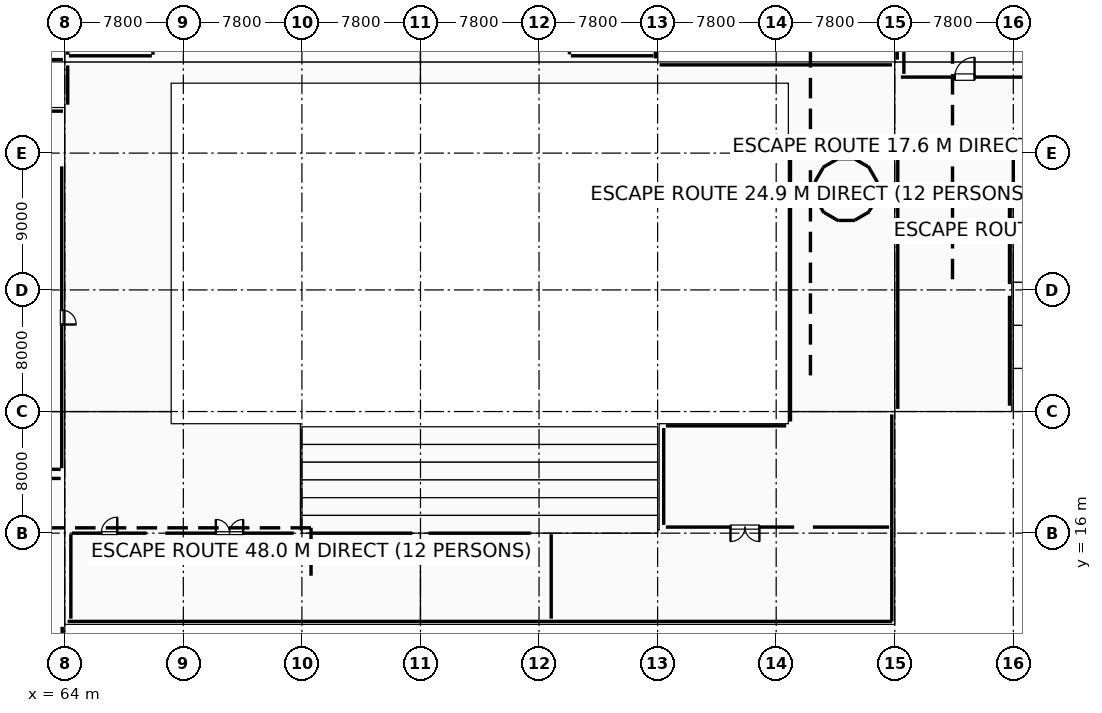
"""IFC4 building model, lengths in metres.
Left out: names, types, materials, properties, quantities, classifications, styles, units other than length and angle.
Written with IfcOpenShell. Run it as: python <this file> out.ifc"""

import sys

from ifc_helpers import new_model, si_unit, direction, frame, frame_2d, origin, origin_2d, place, context, subcontext, project, spatial, rectangle, i_section, extrude, element, fill, save


model = new_model("IFC4")
c1 = context("Model", 3, precision=1e-05, world=origin(), true_north=direction((0.0, 1.0)))
c2 = subcontext(c1, "Body", "Model", "MODEL_VIEW")
j1 = project(units=[si_unit("LENGTHUNIT", "METRE"), si_unit("PLANEANGLEUNIT", "RADIAN")], contexts=[c1])
p1 = place(None, origin())
s1 = spatial("IfcSite", under=j1, at=p1, CompositionType="ELEMENT")
p2 = place(p1, origin())
s2 = spatial("IfcBuilding", under=s1, at=p2, CompositionType="ELEMENT")
p3 = place(p2, frame((0.0, 0.0, 10.2)))
s3 = spatial("IfcBuildingStorey", under=s2, at=p3, CompositionType="ELEMENT", Elevation=10.2)
for number, where, z_axis, x_axis in (
    (1, (126.4, 24.0, 0.0), (0.0, 0.0, 1.0), (1.0, 0.0, 0.0)),
    (2, (126.4, 32.0, 0.0), (0.0, 0.0, 1.0), (1.0, 0.0, 0.0)),
    (3, (126.4, 41.0, 0.0), (0.0, 0.0, 1.0), (1.0, 0.0, 0.0)),
):
    element("IfcColumn", number, at=place(p3, frame(where, z_axis=z_axis, x_axis=x_axis)), inside=s3, PredefinedType="COLUMN", context=c2, shape_type="SweptSolid", body=[
        extrude(rectangle(XDim=0.75, YDim=0.75, at=origin_2d()), origin(), (0.0, 0.0, 1.0), 4.8),
    ])
for number, where, z_axis, x_axis in (
    (4, (64.0, 47.0, 0.0), (0.0, 0.0, 1.0), (1.0, 0.0, 0.0)),
    (5, (71.8, 47.0, 0.0), (0.0, 0.0, 1.0), (1.0, 0.0, 0.0)),
    (6, (79.6, 47.0, 0.0), (0.0, 0.0, 1.0), (1.0, 0.0, 0.0)),
    (7, (87.4, 47.0, 0.0), (0.0, 0.0, 1.0), (1.0, 0.0, 0.0)),
    (8, (95.2, 47.0, 0.0), (0.0, 0.0, 1.0), (1.0, 0.0, 0.0)),
    (9, (103.0, 47.0, 0.0), (0.0, 0.0, 1.0), (1.0, 0.0, 0.0)),
):
    element("IfcColumn", number, at=place(p3, frame(where, z_axis=z_axis, x_axis=x_axis)), inside=s3, PredefinedType="COLUMN", context=c2, shape_type="SweptSolid", body=[
        extrude(i_section(OverallWidth=0.25, OverallDepth=0.45, WebThickness=0.011, FlangeThickness=0.014, FilletRadius=0.015, at=origin_2d()), origin(), (0.0, 0.0, 1.0), 4.8),
    ])
for number, where, z_axis, x_axis in (
    (10, (70.0, 16.0, 0.0), (0.0, 0.0, 1.0), (1.0, 0.0, 0.0)),
    (11, (70.0, 41.0, 0.0), (0.0, 0.0, 1.0), (1.0, 0.0, 0.0)),
):
    element("IfcColumn", number, at=place(p3, frame(where, z_axis=z_axis, x_axis=x_axis)), inside=s3, PredefinedType="COLUMN", context=c2, shape_type="SweptSolid", body=[
        extrude(rectangle(XDim=1.2, YDim=1.2, at=origin_2d()), origin(), (0.0, 0.0, 1.0), 4.8),
    ])
for number, where, z_axis, x_axis in (
    (12, (79.6, 16.0, 0.0), (0.0, 0.0, 1.0), (1.0, 0.0, 0.0)),
    (13, (79.6, 41.0, 0.0), (0.0, 0.0, 1.0), (1.0, 0.0, 0.0)),
    (14, (87.4, 16.0, 0.0), (0.0, 0.0, 1.0), (1.0, 0.0, 0.0)),
    (15, (87.4, 41.0, 0.0), (0.0, 0.0, 1.0), (1.0, 0.0, 0.0)),
    (16, (95.2, 16.0, 0.0), (0.0, 0.0, 1.0), (1.0, 0.0, 0.0)),
    (17, (95.2, 41.0, 0.0), (0.0, 0.0, 1.0), (1.0, 0.0, 0.0)),
    (18, (103.0, 16.0, 0.0), (0.0, 0.0, 1.0), (1.0, 0.0, 0.0)),
    (19, (103.0, 41.0, 0.0), (0.0, 0.0, 1.0), (1.0, 0.0, 0.0)),
):
    element("IfcColumn", number, at=place(p3, frame(where, z_axis=z_axis, x_axis=x_axis)), inside=s3, PredefinedType="COLUMN", context=c2, shape_type="SweptSolid", body=[
        extrude(rectangle(XDim=1.05, YDim=1.05, at=origin_2d()), origin(), (0.0, 0.0, 1.0), 4.8),
    ])
for number, where, z_axis, x_axis in (
    (20, (112.6, 16.0, 0.0), (0.0, 0.0, 1.0), (1.0, 0.0, 0.0)),
    (21, (112.6, 41.0, 0.0), (0.0, 0.0, 1.0), (1.0, 0.0, 0.0)),
):
    element("IfcColumn", number, at=place(p3, frame(where, z_axis=z_axis, x_axis=x_axis)), inside=s3, PredefinedType="COLUMN", context=c2, shape_type="SweptSolid", body=[
        extrude(rectangle(XDim=1.2, YDim=1.2, at=origin_2d()), origin(), (0.0, 0.0, 1.0), 4.8),
    ])
p4 = place(p3, frame((40.12, 43.76, 0.0), z_axis=(0.0, 0.0, 1.0), x_axis=(1.0, 0.0, 0.0)))
e22 = element("IfcWall", 22, at=p4, inside=s3, PredefinedType="PARAPET", context=c2, shape_type="SweptSolid", body=[
    extrude(rectangle(XDim=23.76, YDim=0.18, at=frame_2d((11.88, 0.0))), origin(), (0.0, 0.0, 1.0), 0.88),
])
p5 = place(p3, frame((64.195, 44.185, 0.0), z_axis=(0.0, 0.0, 1.0), x_axis=(0.0, 1.0, 0.0)))
e23 = element("IfcWall", 23, at=p5, inside=s3, PredefinedType="STANDARD", context=c2, shape_type="SweptSolid", body=[
    extrude(rectangle(XDim=2.582, YDim=0.35, at=frame_2d((1.291, 0.0))), origin(), (0.0, 0.0, 1.0), 3.725),
])
p6 = place(p3, frame((63.876, 47.15, 0.0), z_axis=(0.0, 0.0, 1.0), x_axis=(-1.0, 0.0, 0.0)))
e24 = element("IfcWall", 24, at=p6, inside=s3, PredefinedType="ELEMENTEDWALL", context=c2, shape_type="SweptSolid", body=[
    extrude(rectangle(XDim=9.736, YDim=0.26, at=frame_2d((4.868, 0.0))), origin(), (0.0, 0.0, 1.0), 4.54),
])
p7 = place(p6, frame((4.076, 0.0, 0.95)))
e25 = element("IfcOpeningElement", 25, at=p7, cuts=e24, PredefinedType="OPENING", context=c2, shape_type="SweptSolid", body=[
    extrude(rectangle(XDim=1.6, YDim=2.1, at=frame_2d((0.8, 1.05))), frame((0.0, 0.14, 0.0), z_axis=(0.0, -1.0, 0.0), x_axis=(1.0, 0.0, 0.0)), (0.0, 0.0, 1.0), 0.28),
])
p8 = place(p3, frame((102.85, 49.767, 0.0), z_axis=(0.0, 0.0, 1.0), x_axis=(0.0, -1.0, 0.0)))
e26 = element("IfcWall", 26, at=p8, inside=s3, PredefinedType="ELEMENTEDWALL", context=c2, shape_type="SweptSolid", body=[
    extrude(rectangle(XDim=2.534, YDim=0.26, at=frame_2d((1.267, 0.0))), origin(), (0.0, 0.0, 1.0), 4.175),
])
p9 = place(p3, frame((103.129, 46.805, 0.0), z_axis=(0.0, 0.0, 1.0), x_axis=(1.0, 0.0, 0.0)))
e27 = element("IfcWall", 27, at=p9, inside=s3, PredefinedType="STANDARD", context=c2, shape_type="SweptSolid", body=[
    extrude(rectangle(XDim=15.286, YDim=0.35, at=frame_2d((7.643, 0.0))), origin(), (0.0, 0.0, 1.0), 3.725),
])
p10 = place(p3, frame((118.76, 47.15, 0.0), z_axis=(0.0, 0.0, 1.0), x_axis=(0.0, 1.0, 0.0)))
e28 = element("IfcWall", 28, at=p10, inside=s3, PredefinedType="STANDARD", context=c2, shape_type="SweptSolid", body=[
    extrude(rectangle(XDim=2.467, YDim=0.28, at=frame_2d((1.233, 0.0))), origin(), (0.0, 0.0, 1.0), 4.54),
])
p11 = place(p3, frame((147.55, 38.56, 0.0), z_axis=(0.0, 0.0, 1.0), x_axis=(-1.0, 0.0, 0.0)))
e29 = element("IfcWall", 29, at=p11, inside=s3, PredefinedType="STANDARD", context=c2, shape_type="SweptSolid", body=[
    extrude(rectangle(XDim=21.1, YDim=0.28, at=frame_2d((10.55, 0.0))), origin(), (0.0, 0.0, 1.0), 4.54),
])
p12 = place(p3, frame((126.15, 38.26, 0.0), z_axis=(0.0, 0.0, 1.0), x_axis=(0.0, -1.0, 0.0)))
e30 = element("IfcWall", 30, at=p12, inside=s3, PredefinedType="ELEMENTEDWALL", context=c2, shape_type="SweptSolid", body=[
    extrude(rectangle(XDim=5.877, YDim=0.26, at=frame_2d((2.938, 0.0))), origin(), (0.0, 0.0, 1.0), 3.775),
])
p13 = place(p3, frame((126.15, 31.617, 0.0), z_axis=(0.0, 0.0, 1.0), x_axis=(0.0, -1.0, 0.0)))
e31 = element("IfcWall", 31, at=p13, inside=s3, PredefinedType="ELEMENTEDWALL", context=c2, shape_type="SweptSolid", body=[
    extrude(rectangle(XDim=7.234, YDim=0.26, at=frame_2d((3.617, 0.0))), origin(), (0.0, 0.0, 1.0), 3.675),
])
p14 = place(p3, frame((118.405, 23.815, 0.0), z_axis=(0.0, 0.0, 1.0), x_axis=(0.0, -1.0, 0.0)))
e32 = element("IfcWall", 32, at=p14, inside=s3, PredefinedType="STANDARD", context=c2, shape_type="SweptSolid", body=[
    extrude(rectangle(XDim=13.63, YDim=0.35, at=frame_2d((6.815, 0.0))), origin(), (0.0, 0.0, 1.0), 3.725),
])
p15 = place(p3, frame((118.415, 10.195, 0.0), z_axis=(0.0, 0.0, 1.0), x_axis=(-1.0, 0.0, 0.0)))
e33 = element("IfcWall", 33, at=p15, inside=s3, PredefinedType="STANDARD", context=c2, shape_type="SweptSolid", body=[
    extrude(rectangle(XDim=54.23, YDim=0.35, at=frame_2d((27.115, 0.0))), origin(), (0.0, 0.0, 1.0), 3.725),
])
p16 = place(p3, frame((63.83, 9.84, 0.0), z_axis=(0.0, 0.0, 1.0), x_axis=(0.0, -1.0, 0.0)))
e34 = element("IfcWall", 34, at=p16, inside=s3, PredefinedType="STANDARD", context=c2, shape_type="SweptSolid", body=[
    extrude(rectangle(XDim=1.382, YDim=0.3, at=frame_2d((0.691, 0.0))), origin(), (0.0, 0.0, 1.0), 4.58),
])
p17 = place(p3, frame((119.0, 46.0, 0.0), z_axis=(0.0, 0.0, 1.0), x_axis=(1.0, 0.0, 0.0)))
e35 = element("IfcWall", 35, at=p17, inside=s3, PredefinedType="SHEAR", context=c2, shape_type="SweptSolid", body=[
    extrude(rectangle(XDim=8.4, YDim=0.4, at=frame_2d((4.2, 0.0))), origin(), (0.0, 0.0, 1.0), 4.54),
])
p18 = place(p17, frame((3.55, 0.0, 0.0)))
e36 = element("IfcOpeningElement", 36, at=p18, cuts=e35, PredefinedType="OPENING", context=c2, shape_type="SweptSolid", body=[
    extrude(rectangle(XDim=1.3, YDim=2.15, at=frame_2d((0.65, 1.075))), frame((0.0, 0.21, 0.0), z_axis=(0.0, -1.0, 0.0), x_axis=(1.0, 0.0, 0.0)), (0.0, 0.0, 1.0), 0.42),
])
p19 = place(p3, frame((119.2, 54.59, 0.0), z_axis=(0.0, 0.0, 1.0), x_axis=(0.0, -1.0, 0.0)))
e37 = element("IfcWall", 37, at=p19, inside=s3, PredefinedType="SHEAR", context=c2, shape_type="SweptSolid", body=[
    extrude(rectangle(XDim=8.38, YDim=0.4, at=frame_2d((4.19, 0.0))), origin(), (0.0, 0.0, 1.0), 4.54),
])
p20 = place(p3, frame((117.461, 39.086, 0.0), z_axis=(0.0, 0.0, 1.0), x_axis=(-0.500080723117, 0.865978793255, 0.0)))
e38 = element("IfcWall", 38, at=p20, inside=s3, PredefinedType="SHEAR", context=c2, shape_type="SweptSolid", body=[
    extrude(rectangle(XDim=1.219, YDim=0.35, at=frame_2d((0.609, 0.0))), origin(), (0.0, 0.0, 1.0), 4.54),
])
for number, where, z_axis, x_axis in (
    (39, (116.833, 40.115, 0.0), (0.0, 0.0, 1.0), (-0.866, 0.5, 0.0)),
    (40, (115.884, 40.628, 0.0), (0.0, 0.0, 1.0), (-1.0, 0.0, 0.0)),
    (41, (114.804, 40.598, 0.0), (0.0, 0.0, 1.0), (-0.866, -0.5, 0.0)),
    (42, (113.885, 40.033, 0.0), (0.0, 0.0, 1.0), (-0.5, -0.866, 0.0)),
    (43, (113.372, 39.083, 0.0), (0.0, 0.0, 1.0), (0.0, -1.0, 0.0)),
    (44, (113.402, 38.004, 0.0), (0.0, 0.0, 1.0), (0.5, -0.866, 0.0)),
    (45, (113.967, 37.085, 0.0), (0.0, 0.0, 1.0), (0.866, -0.5, 0.0)),
    (46, (114.917, 36.572, 0.0), (0.0, 0.0, 1.0), (1.0, 0.0, 0.0)),
    (47, (115.996, 36.602, 0.0), (0.0, 0.0, 1.0), (0.866, 0.5, 0.0)),
    (48, (116.915, 37.167, 0.0), (0.0, 0.0, 1.0), (0.5, 0.866, 0.0)),
):
    element("IfcWall", number, at=place(p3, frame(where, z_axis=z_axis, x_axis=x_axis)), inside=s3, PredefinedType="SHEAR", context=c2, shape_type="SweptSolid", body=[
        extrude(rectangle(XDim=1.093, YDim=0.35, at=frame_2d((0.546, 0.0))), origin(), (0.0, 0.0, 1.0), 4.54),
    ])
p21 = place(p3, frame((117.428, 38.116, 0.0), z_axis=(0.0, 0.0, 1.0), x_axis=(0.0, 1.0, 0.0)))
e49 = element("IfcWall", 49, at=p21, inside=s3, PredefinedType="SHEAR", context=c2, shape_type="SweptSolid", body=[
    extrude(rectangle(XDim=0.967, YDim=0.35, at=frame_2d((0.483, 0.0))), origin(), (0.0, 0.0, 1.0), 4.54),
])
p22 = place(p3, frame((118.226, 16.4, 0.0), z_axis=(0.0, 0.0, 1.0), x_axis=(-1.0, 0.0, 0.0)))
e50 = element("IfcWall", 50, at=p22, inside=s3, PredefinedType="PARTITIONING", context=c2, shape_type="SweptSolid", body=[
    extrude(rectangle(XDim=5.011, YDim=0.25, at=frame_2d((2.505, 0.0))), origin(), (0.0, 0.0, 1.0), 4.53),
])
p23 = place(p3, frame((111.985, 16.4, 0.0), z_axis=(0.0, 0.0, 1.0), x_axis=(-1.0, 0.0, 0.0)))
e51 = element("IfcWall", 51, at=p23, inside=s3, PredefinedType="PARTITIONING", context=c2, shape_type="SweptSolid", body=[
    extrude(rectangle(XDim=8.44, YDim=0.25, at=frame_2d((4.22, 0.0))), origin(), (0.0, 0.0, 1.0), 4.53),
])
p24 = place(p23, frame((2.289, 0.0, 0.0)))
e52 = element("IfcOpeningElement", 52, at=p24, cuts=e51, PredefinedType="OPENING", context=c2, shape_type="SweptSolid", body=[
    extrude(rectangle(XDim=1.9, YDim=2.35, at=frame_2d((0.95, 1.175))), frame((0.0, 0.135, 0.0), z_axis=(0.0, -1.0, 0.0), x_axis=(1.0, 0.0, 0.0)), (0.0, 0.0, 1.0), 0.27),
])
p25 = place(p3, frame((103.4, 16.545, 0.0), z_axis=(0.0, 0.0, 1.0), x_axis=(0.0, 1.0, 0.0)))
e53 = element("IfcWall", 53, at=p25, inside=s3, PredefinedType="PARTITIONING", context=c2, shape_type="SweptSolid", body=[
    extrude(rectangle(XDim=6.37, YDim=0.25, at=frame_2d((3.185, 0.0))), origin(), (0.0, 0.0, 1.0), 3.215),
])
p26 = place(p3, frame((103.545, 23.06, 0.0), z_axis=(0.0, 0.0, 1.0), x_axis=(1.0, 0.0, 0.0)))
e54 = element("IfcWall", 54, at=p26, inside=s3, PredefinedType="PARTITIONING", context=c2, shape_type="SweptSolid", body=[
    extrude(rectangle(XDim=7.91, YDim=0.25, at=frame_2d((3.955, 0.0))), origin(), (0.0, 0.0, 1.0), 4.53),
])
p27 = place(p3, frame((111.74, 23.345, 0.0), z_axis=(0.0, 0.0, 1.0), x_axis=(0.0, 1.0, 0.0)))
e55 = element("IfcWall", 55, at=p27, inside=s3, PredefinedType="PARTITIONING", context=c2, shape_type="SweptSolid", body=[
    extrude(rectangle(XDim=17.51, YDim=0.25, at=frame_2d((8.755, 0.0))), origin(), (0.0, 0.0, 1.0), 4.53),
])
p28 = place(p3, frame((118.945, 41.0, 0.0), z_axis=(0.0, 0.0, 1.0), x_axis=(1.0, 0.0, 0.0)))
e56 = element("IfcWall", 56, at=p28, inside=s3, PredefinedType="PARTITIONING", context=c2, shape_type="SweptSolid", body=[
    extrude(rectangle(XDim=7.076, YDim=0.25, at=frame_2d((3.538, 0.0))), origin(), (0.0, 0.0, 1.0), 4.22),
])
p29 = place(p28, frame((2.455, 0.0, 0.0)))
e57 = element("IfcOpeningElement", 57, at=p29, cuts=e56, PredefinedType="OPENING", context=c2, shape_type="SweptSolid", body=[
    extrude(rectangle(XDim=2.0, YDim=2.35, at=frame_2d((1.0, 1.175))), frame((0.0, 0.135, 0.0), z_axis=(0.0, -1.0, 0.0), x_axis=(1.0, 0.0, 0.0)), (0.0, 0.0, 1.0), 0.27),
])
p30 = place(p3, frame((118.8, 24.176, 0.0), z_axis=(0.0, 0.0, 1.0), x_axis=(0.0, 1.0, 0.0)))
e58 = element("IfcWall", 58, at=p30, inside=s3, PredefinedType="PARTITIONING", context=c2, shape_type="SweptSolid", body=[
    extrude(rectangle(XDim=16.679, YDim=0.25, at=frame_2d((8.339, 0.0))), origin(), (0.0, 0.0, 1.0), 3.72),
])
p31 = place(p3, frame((126.79, 41.0, 0.0), z_axis=(0.0, 0.0, 1.0), x_axis=(1.0, 0.0, 0.0)))
e59 = element("IfcWall", 59, at=p31, inside=s3, PredefinedType="PARTITIONING", context=c2, shape_type="SweptSolid", body=[
    extrude(rectangle(XDim=8.22, YDim=0.25, at=frame_2d((4.11, 0.0))), origin(), (0.0, 0.0, 1.0), 3.92),
])
p32 = place(p3, frame((126.4, 38.745, 0.0), z_axis=(0.0, 0.0, 1.0), x_axis=(0.0, 1.0, 0.0)))
e60 = element("IfcWall", 60, at=p32, inside=s3, PredefinedType="PARTITIONING", context=c2, shape_type="SweptSolid", body=[
    extrude(rectangle(XDim=1.865, YDim=0.25, at=frame_2d((0.933, 0.0))), origin(), (0.0, 0.0, 1.0), 3.77),
])
p33 = place(p3, frame((64.47, 16.0, 0.0), z_axis=(0.0, 0.0, 1.0), x_axis=(1.0, 0.0, 0.0)))
e61 = element("IfcWall", 61, at=p33, inside=s3, PredefinedType="PARTITIONING", context=c2, shape_type="SweptSolid", body=[
    extrude(rectangle(XDim=4.915, YDim=0.1, at=frame_2d((2.458, 0.0))), origin(), (0.0, 0.0, 1.0), 3.92),
])
p34 = place(p33, frame((1.933, 0.0, 0.0)))
e62 = element("IfcOpeningElement", 62, at=p34, cuts=e61, PredefinedType="OPENING", context=c2, shape_type="SweptSolid", body=[
    extrude(rectangle(XDim=1.05, YDim=2.15, at=frame_2d((0.525, 1.075))), frame((0.0, 0.06, 0.0), z_axis=(0.0, -1.0, 0.0), x_axis=(1.0, 0.0, 0.0)), (0.0, 0.0, 1.0), 0.12),
])
p35 = place(p3, frame((70.615, 16.0, 0.0), z_axis=(0.0, 0.0, 1.0), x_axis=(1.0, 0.0, 0.0)))
e63 = element("IfcWall", 63, at=p35, inside=s3, PredefinedType="PARTITIONING", context=c2, shape_type="SweptSolid", body=[
    extrude(rectangle(XDim=8.445, YDim=0.1, at=frame_2d((4.223, 0.0))), origin(), (0.0, 0.0, 1.0), 3.97),
])
p36 = place(p35, frame((3.323, 0.0, 0.0)))
e64 = element("IfcOpeningElement", 64, at=p36, cuts=e63, PredefinedType="OPENING", context=c2, shape_type="SweptSolid", body=[
    extrude(rectangle(XDim=1.8, YDim=2.15, at=frame_2d((0.9, 1.075))), frame((0.0, 0.06, 0.0), z_axis=(0.0, -1.0, 0.0), x_axis=(1.0, 0.0, 0.0)), (0.0, 0.0, 1.0), 0.12),
])
p37 = place(p3, frame((80.14, 16.0, 0.0), z_axis=(0.0, 0.0, 1.0), x_axis=(1.0, 0.0, 0.0)))
e65 = element("IfcWall", 65, at=p37, inside=s3, PredefinedType="PARTITIONING", context=c2, shape_type="SweptSolid", body=[
    extrude(rectangle(XDim=6.72, YDim=0.1, at=frame_2d((3.36, 0.0))), origin(), (0.0, 0.0, 1.0), 4.02),
])
p38 = place(p3, frame((87.94, 16.0, 0.0), z_axis=(0.0, 0.0, 1.0), x_axis=(1.0, 0.0, 0.0)))
e66 = element("IfcWall", 66, at=p38, inside=s3, PredefinedType="PARTITIONING", context=c2, shape_type="SweptSolid", body=[
    extrude(rectangle(XDim=6.72, YDim=0.1, at=frame_2d((3.36, 0.0))), origin(), (0.0, 0.0, 1.0), 4.07),
])
p39 = place(p3, frame((96.0, 15.93, 0.0), z_axis=(0.0, 0.0, 1.0), x_axis=(0.0, -1.0, 0.0)))
e67 = element("IfcWall", 67, at=p39, inside=s3, PredefinedType="PARTITIONING", context=c2, shape_type="SweptSolid", body=[
    extrude(rectangle(XDim=5.556, YDim=0.1, at=frame_2d((2.778, 0.0))), origin(), (0.0, 0.0, 1.0), 4.53),
])
p40 = place(p3, frame((64.4, 10.374, 0.0), z_axis=(0.0, 0.0, 1.0), x_axis=(0.0, 1.0, 0.0)))
e68 = element("IfcWall", 68, at=p40, inside=s3, PredefinedType="PARTITIONING", context=c2, shape_type="SweptSolid", body=[
    extrude(rectangle(XDim=5.556, YDim=0.1, at=frame_2d((2.778, 0.0))), origin(), (0.0, 0.0, 1.0), 3.72),
])
p41 = place(p3, frame((40.47, 19.6, 0.0), z_axis=(0.0, 0.0, 1.0), x_axis=(1.0, 0.0, 0.0)))
e69 = element("IfcWall", 69, at=p41, inside=s3, PredefinedType="PARTITIONING", context=c2, shape_type="SweptSolid", body=[
    extrude(rectangle(XDim=23.26, YDim=0.1, at=frame_2d((11.63, 0.0))), origin(), (0.0, 0.0, 1.0), 4.53),
])
p42 = place(p3, frame((63.8, 40.13, 0.0), z_axis=(0.0, 0.0, 1.0), x_axis=(0.0, -1.0, 0.0)))
e70 = element("IfcWall", 70, at=p42, inside=s3, PredefinedType="PARTITIONING", context=c2, shape_type="SweptSolid", body=[
    extrude(rectangle(XDim=19.86, YDim=0.1, at=frame_2d((9.93, 0.0))), origin(), (0.0, 0.0, 1.0), 3.72),
])
p43 = place(p42, frame((9.455, 0.0, 0.0)))
e71 = element("IfcOpeningElement", 71, at=p43, cuts=e70, PredefinedType="OPENING", context=c2, shape_type="SweptSolid", body=[
    extrude(rectangle(XDim=0.95, YDim=2.15, at=frame_2d((0.475, 1.075))), frame((0.0, 0.06, 0.0), z_axis=(0.0, -1.0, 0.0), x_axis=(1.0, 0.0, 0.0)), (0.0, 0.0, 1.0), 0.12),
])
p44 = place(p3, frame((63.73, 20.2, 0.0), z_axis=(0.0, 0.0, 1.0), x_axis=(-1.0, 0.0, 0.0)))
e72 = element("IfcWall", 72, at=p44, inside=s3, PredefinedType="PARTITIONING", context=c2, shape_type="SweptSolid", body=[
    extrude(rectangle(XDim=7.26, YDim=0.1, at=frame_2d((3.63, 0.0))), origin(), (0.0, 0.0, 1.0), 4.53),
])
p45 = place(p3, frame((69.8, 69.73, 0.0), z_axis=(0.0, 0.0, 1.0), x_axis=(0.0, -1.0, 0.0)))
e73 = element("IfcWall", 73, at=p45, inside=s3, PredefinedType="PARTITIONING", context=c2, shape_type="SweptSolid", body=[
    extrude(rectangle(XDim=22.26, YDim=0.1, at=frame_2d((11.13, 0.0))), origin(), (0.0, 0.0, 1.0), 4.53),
])
p46 = place(p3, frame((69.73, 47.4, 0.0), z_axis=(0.0, 0.0, 1.0), x_axis=(-1.0, 0.0, 0.0)))
e74 = element("IfcWall", 74, at=p46, inside=s3, PredefinedType="PARTITIONING", context=c2, shape_type="SweptSolid", body=[
    extrude(rectangle(XDim=5.46, YDim=0.1, at=frame_2d((2.73, 0.0))), origin(), (0.0, 0.0, 1.0), 3.72),
])
p47 = place(p3, frame((64.2, 47.47, 0.0), z_axis=(0.0, 0.0, 1.0), x_axis=(0.0, 1.0, 0.0)))
e75 = element("IfcWall", 75, at=p47, inside=s3, PredefinedType="PARTITIONING", context=c2, shape_type="SweptSolid", body=[
    extrude(rectangle(XDim=2.29, YDim=0.1, at=frame_2d((1.145, 0.0))), origin(), (0.0, 0.0, 1.0), 4.22),
])
p48 = place(p3, frame((102.716, 47.4, 0.0), z_axis=(0.0, 0.0, 1.0), x_axis=(-1.0, 0.0, 0.0)))
e76 = element("IfcWall", 76, at=p48, inside=s3, PredefinedType="PARTITIONING", context=c2, shape_type="SweptSolid", body=[
    extrude(rectangle(XDim=5.421, YDim=0.15, at=frame_2d((2.71, 0.0))), origin(), (0.0, 0.0, 1.0), 3.72),
])
p49 = place(p3, frame((97.2, 47.495, 0.0), z_axis=(0.0, 0.0, 1.0), x_axis=(0.0, 1.0, 0.0)))
e77 = element("IfcWall", 77, at=p49, inside=s3, PredefinedType="PARTITIONING", context=c2, shape_type="SweptSolid", body=[
    extrude(rectangle(XDim=22.21, YDim=0.15, at=frame_2d((11.105, 0.0))), origin(), (0.0, 0.0, 1.0), 4.53),
])
p50 = place(p18, origin())
e78 = element("IfcDoor", 78, at=p50, inside=s3, OperationType="SINGLE_SWING_RIGHT", PredefinedType="DOOR", context=c2, shape_type="SweptSolid", body=[
    extrude(rectangle(XDim=1.3, YDim=2.15, at=frame_2d((0.65, 1.075))), frame((0.0, 0.025, 0.0), z_axis=(0.0, -1.0, 0.0), x_axis=(1.0, 0.0, 0.0)), (0.0, 0.0, 1.0), 0.05),
])
fill(e36, e78)
p51 = place(p24, origin())
e79 = element("IfcDoor", 79, at=p51, inside=s3, OperationType="DOUBLE_SWING_RIGHT", PredefinedType="DOOR", context=c2, shape_type="SweptSolid", body=[
    extrude(rectangle(XDim=1.9, YDim=2.35, at=frame_2d((0.95, 1.175))), frame((0.0, 0.025, 0.0), z_axis=(0.0, -1.0, 0.0), x_axis=(1.0, 0.0, 0.0)), (0.0, 0.0, 1.0), 0.05),
])
fill(e52, e79)
p52 = place(p29, origin())
e80 = element("IfcDoor", 80, at=p52, inside=s3, OperationType="DOUBLE_SWING_LEFT", PredefinedType="DOOR", context=c2, shape_type="SweptSolid", body=[
    extrude(rectangle(XDim=2.0, YDim=2.35, at=frame_2d((1.0, 1.175))), frame((0.0, 0.025, 0.0), z_axis=(0.0, -1.0, 0.0), x_axis=(1.0, 0.0, 0.0)), (0.0, 0.0, 1.0), 0.05),
])
fill(e57, e80)
p53 = place(p34, origin())
e81 = element("IfcDoor", 81, at=p53, inside=s3, OperationType="SINGLE_SWING_RIGHT", PredefinedType="DOOR", context=c2, shape_type="SweptSolid", body=[
    extrude(rectangle(XDim=1.05, YDim=2.15, at=frame_2d((0.525, 1.075))), frame((0.0, 0.025, 0.0), z_axis=(0.0, -1.0, 0.0), x_axis=(1.0, 0.0, 0.0)), (0.0, 0.0, 1.0), 0.05),
])
fill(e62, e81)
p54 = place(p43, origin())
e82 = element("IfcDoor", 82, at=p54, inside=s3, OperationType="SINGLE_SWING_RIGHT", PredefinedType="DOOR", context=c2, shape_type="SweptSolid", body=[
    extrude(rectangle(XDim=0.95, YDim=2.15, at=frame_2d((0.475, 1.075))), frame((0.0, 0.025, 0.0), z_axis=(0.0, -1.0, 0.0), x_axis=(1.0, 0.0, 0.0)), (0.0, 0.0, 1.0), 0.05),
])
fill(e71, e82)
p55 = place(p36, origin())
e83 = element("IfcDoor", 83, at=p55, inside=s3, OperationType="DOUBLE_DOOR_SINGLE_SWING", PredefinedType="DOOR", context=c2, shape_type="SweptSolid", body=[
    extrude(rectangle(XDim=1.8, YDim=2.15, at=frame_2d((0.9, 1.075))), frame((0.0, 0.025, 0.0), z_axis=(0.0, -1.0, 0.0), x_axis=(1.0, 0.0, 0.0)), (0.0, 0.0, 1.0), 0.05),
])
fill(e64, e83)
save(model, sys.argv[1])
